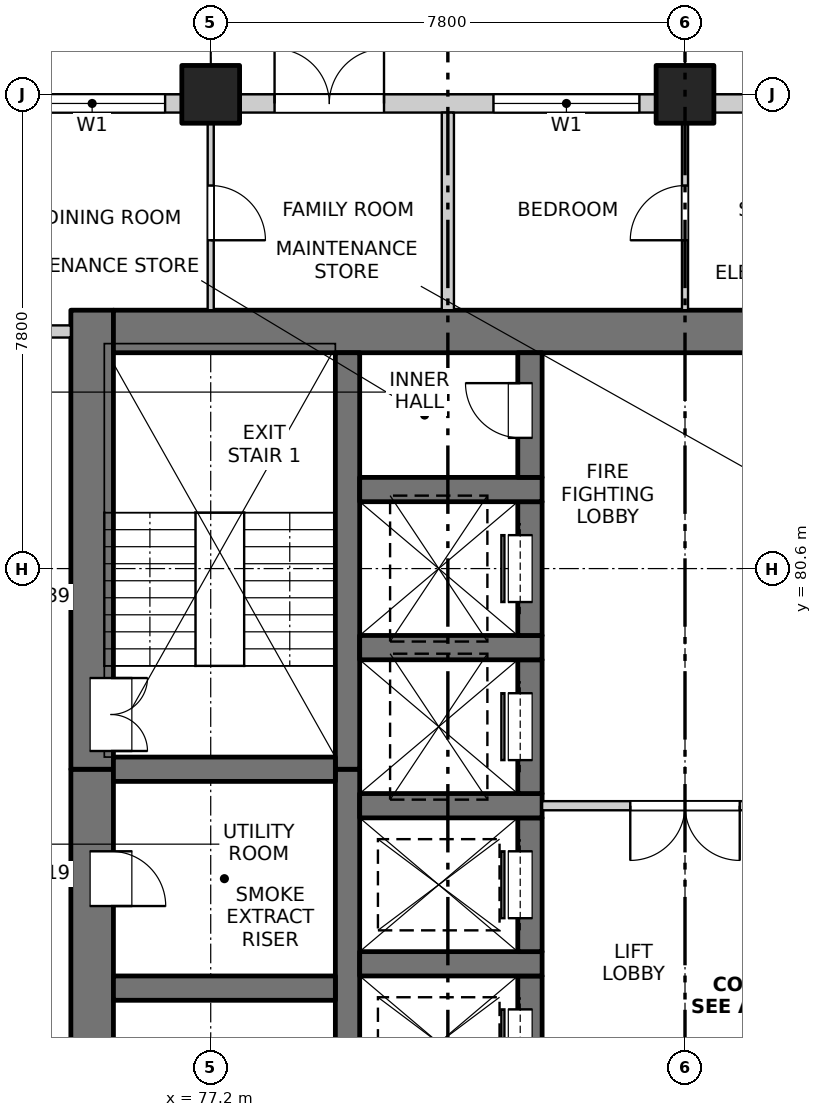
"""IFC4 building model, lengths in metres.
Left out: names, types, materials, properties, quantities, classifications, styles, units other than length and angle.
Written with IfcOpenShell. Run it as: python <this file> out.ifc"""

import sys

from ifc_helpers import new_model, si_unit, direction, frame, frame_2d, origin, origin_2d, place, context, subcontext, project, spatial, rectangle, extrude, element, fill, save


model = new_model("IFC4")
c1 = context("Model", 3, precision=1e-05, world=origin(), true_north=direction((0.0, 1.0)))
c2 = subcontext(c1, "Body", "Model", "MODEL_VIEW")
j1 = project(units=[si_unit("LENGTHUNIT", "METRE"), si_unit("PLANEANGLEUNIT", "RADIAN")], contexts=[c1])
p1 = place(None, origin())
s1 = spatial("IfcSite", under=j1, at=p1, CompositionType="ELEMENT")
p2 = place(p1, origin())
s2 = spatial("IfcBuilding", under=s1, at=p2, CompositionType="ELEMENT")
p3 = place(p2, frame((0.0, 0.0, 58.0)))
s3 = spatial("IfcBuildingStorey", under=s2, at=p3, CompositionType="ELEMENT", Elevation=58.0)
for number, where, z_axis, x_axis in (
    (1, (77.2, 88.4, -0.25), (0.0, 0.0, 1.0), (1.0, 0.0, 0.0)),
    (2, (85.0, 88.4, -0.25), (0.0, 0.0, 1.0), (1.0, 0.0, 0.0)),
):
    element("IfcColumn", number, at=place(p3, frame(where, z_axis=z_axis, x_axis=x_axis)), inside=s3, PredefinedType="COLUMN", context=c2, shape_type="SweptSolid", body=[
        extrude(rectangle(XDim=0.95, YDim=0.95, at=origin_2d()), origin(), (0.0, 0.0, 1.0), 3.4),
    ])
p4 = place(p3, frame((75.25, 54.9, -0.25), z_axis=(0.0, 0.0, 1.0), x_axis=(0.0, 1.0, 0.0)))
e3 = element("IfcWall", 3, at=p4, inside=s3, PredefinedType="SOLIDWALL", context=c2, shape_type="SweptSolid", body=[
    extrude(rectangle(XDim=22.4, YDim=0.7, at=frame_2d((11.2, 0.0))), origin(), (0.0, 0.0, 1.0), 3.4),
])
p5 = place(p4, frame((7.55, 0.0, 0.25)))
e4 = element("IfcOpeningElement", 4, at=p5, cuts=e3, PredefinedType="OPENING", context=c2, shape_type="SweptSolid", body=[
    extrude(rectangle(XDim=0.9, YDim=2.1, at=frame_2d((0.45, 1.05))), frame((0.0, 0.36, 0.0), z_axis=(0.0, -1.0, 0.0), x_axis=(1.0, 0.0, 0.0)), (0.0, 0.0, 1.0), 0.72),
])
p6 = place(p4, frame((12.2, 0.0, 0.25)))
e5 = element("IfcOpeningElement", 5, at=p6, cuts=e3, PredefinedType="OPENING", context=c2, shape_type="SweptSolid", body=[
    extrude(rectangle(XDim=0.9, YDim=2.1, at=frame_2d((0.45, 1.05))), frame((0.0, 0.36, 0.0), z_axis=(0.0, -1.0, 0.0), x_axis=(1.0, 0.0, 0.0)), (0.0, 0.0, 1.0), 0.72),
])
p7 = place(p4, frame((16.7, 0.0, 0.25)))
e6 = element("IfcOpeningElement", 6, at=p7, cuts=e3, PredefinedType="OPENING", context=c2, shape_type="SweptSolid", body=[
    extrude(rectangle(XDim=0.9, YDim=2.1, at=frame_2d((0.45, 1.05))), frame((0.0, 0.36, 0.0), z_axis=(0.0, -1.0, 0.0), x_axis=(1.0, 0.0, 0.0)), (0.0, 0.0, 1.0), 0.72),
])
p8 = place(p4, frame((20.15, 0.0, 0.25)))
e7 = element("IfcOpeningElement", 7, at=p8, cuts=e3, PredefinedType="OPENING", context=c2, shape_type="SweptSolid", body=[
    extrude(rectangle(XDim=0.9, YDim=2.1, at=frame_2d((0.45, 1.05))), frame((0.0, 0.36, 0.0), z_axis=(0.0, -1.0, 0.0), x_axis=(1.0, 0.0, 0.0)), (0.0, 0.0, 1.0), 0.72),
])
p9 = place(p3, frame((75.25, 77.3, -0.25), z_axis=(0.0, 0.0, 1.0), x_axis=(0.0, 1.0, 0.0)))
e8 = element("IfcWall", 8, at=p9, inside=s3, PredefinedType="SOLIDWALL", context=c2, shape_type="SweptSolid", body=[
    extrude(rectangle(XDim=7.55, YDim=0.7, at=frame_2d((3.775, 0.0))), origin(), (0.0, 0.0, 1.0), 3.4),
])
p10 = place(p9, frame((0.3, 0.0, 0.25)))
e9 = element("IfcOpeningElement", 9, at=p10, cuts=e8, PredefinedType="OPENING", context=c2, shape_type="SweptSolid", body=[
    extrude(rectangle(XDim=1.2, YDim=2.1, at=frame_2d((0.6, 1.05))), frame((0.0, 0.36, 0.0), z_axis=(0.0, -1.0, 0.0), x_axis=(1.0, 0.0, 0.0)), (0.0, 0.0, 1.0), 0.72),
])
p11 = place(p3, frame((75.6, 84.5, -0.25), z_axis=(0.0, 0.0, 1.0), x_axis=(1.0, 0.0, 0.0)))
e10 = element("IfcWall", 10, at=p11, inside=s3, PredefinedType="SOLIDWALL", context=c2, shape_type="SweptSolid", body=[
    extrude(rectangle(XDim=18.8, YDim=0.7, at=frame_2d((9.4, 0.0))), origin(), (0.0, 0.0, 1.0), 3.4),
])
p12 = place(p3, frame((79.45, 60.9, -0.25), z_axis=(0.0, 0.0, 1.0), x_axis=(0.0, 1.0, 0.0)))
e11 = element("IfcWall", 11, at=p12, inside=s3, PredefinedType="SOLIDWALL", context=c2, shape_type="SweptSolid", body=[
    extrude(rectangle(XDim=16.4, YDim=0.4, at=frame_2d((8.2, 0.0))), origin(), (0.0, 0.0, 1.0), 3.4),
])
p13 = place(p3, frame((79.45, 77.3, -0.25), z_axis=(0.0, 0.0, 1.0), x_axis=(0.0, 1.0, 0.0)))
e12 = element("IfcWall", 12, at=p13, inside=s3, PredefinedType="SOLIDWALL", context=c2, shape_type="SweptSolid", body=[
    extrude(rectangle(XDim=6.85, YDim=0.4, at=frame_2d((3.425, 0.0))), origin(), (0.0, 0.0, 1.0), 3.4),
])
p14 = place(p3, frame((82.45, 71.7, -0.25), z_axis=(0.0, 0.0, 1.0), x_axis=(0.0, 1.0, 0.0)))
e13 = element("IfcWall", 13, at=p14, inside=s3, PredefinedType="SOLIDWALL", context=c2, shape_type="SweptSolid", body=[
    extrude(rectangle(XDim=2.2, YDim=0.4, at=frame_2d((1.1, 0.0))), origin(), (0.0, 0.0, 1.0), 3.4),
])
p15 = place(p14, frame((0.55, 0.0, 0.25)))
e14 = element("IfcOpeningElement", 14, at=p15, cuts=e13, PredefinedType="OPENING", context=c2, shape_type="SweptSolid", body=[
    extrude(rectangle(XDim=1.1, YDim=2.1, at=frame_2d((0.55, 1.05))), frame((0.0, 0.21, 0.0), z_axis=(0.0, -1.0, 0.0), x_axis=(1.0, 0.0, 0.0)), (0.0, 0.0, 1.0), 0.42),
])
p16 = place(p3, frame((79.65, 74.1, -0.25), z_axis=(0.0, 0.0, 1.0), x_axis=(1.0, 0.0, 0.0)))
e15 = element("IfcWall", 15, at=p16, inside=s3, PredefinedType="SOLIDWALL", context=c2, shape_type="SweptSolid", body=[
    extrude(rectangle(XDim=3.0, YDim=0.4, at=frame_2d((1.5, 0.0))), origin(), (0.0, 0.0, 1.0), 3.4),
])
p17 = place(p3, frame((82.45, 74.3, -0.25), z_axis=(0.0, 0.0, 1.0), x_axis=(0.0, 1.0, 0.0)))
e16 = element("IfcWall", 16, at=p17, inside=s3, PredefinedType="SOLIDWALL", context=c2, shape_type="SweptSolid", body=[
    extrude(rectangle(XDim=2.2, YDim=0.4, at=frame_2d((1.1, 0.0))), origin(), (0.0, 0.0, 1.0), 3.4),
])
p18 = place(p17, frame((0.55, 0.0, 0.25)))
e17 = element("IfcOpeningElement", 17, at=p18, cuts=e16, PredefinedType="OPENING", context=c2, shape_type="SweptSolid", body=[
    extrude(rectangle(XDim=1.1, YDim=2.1, at=frame_2d((0.55, 1.05))), frame((0.0, 0.21, 0.0), z_axis=(0.0, -1.0, 0.0), x_axis=(1.0, 0.0, 0.0)), (0.0, 0.0, 1.0), 0.42),
])
p19 = place(p3, frame((79.65, 76.7, -0.25), z_axis=(0.0, 0.0, 1.0), x_axis=(1.0, 0.0, 0.0)))
e18 = element("IfcWall", 18, at=p19, inside=s3, PredefinedType="SOLIDWALL", context=c2, shape_type="SweptSolid", body=[
    extrude(rectangle(XDim=3.0, YDim=0.4, at=frame_2d((1.5, 0.0))), origin(), (0.0, 0.0, 1.0), 3.4),
])
p20 = place(p3, frame((82.45, 76.9, -0.25), z_axis=(0.0, 0.0, 1.0), x_axis=(0.0, 1.0, 0.0)))
e19 = element("IfcWall", 19, at=p20, inside=s3, PredefinedType="SOLIDWALL", context=c2, shape_type="SweptSolid", body=[
    extrude(rectangle(XDim=2.2, YDim=0.4, at=frame_2d((1.1, 0.0))), origin(), (0.0, 0.0, 1.0), 3.4),
])
p21 = place(p20, frame((0.55, 0.0, 0.25)))
e20 = element("IfcOpeningElement", 20, at=p21, cuts=e19, PredefinedType="OPENING", context=c2, shape_type="SweptSolid", body=[
    extrude(rectangle(XDim=1.1, YDim=2.1, at=frame_2d((0.55, 1.05))), frame((0.0, 0.21, 0.0), z_axis=(0.0, -1.0, 0.0), x_axis=(1.0, 0.0, 0.0)), (0.0, 0.0, 1.0), 0.42),
])
p22 = place(p3, frame((79.65, 79.3, -0.25), z_axis=(0.0, 0.0, 1.0), x_axis=(1.0, 0.0, 0.0)))
e21 = element("IfcWall", 21, at=p22, inside=s3, PredefinedType="SOLIDWALL", context=c2, shape_type="SweptSolid", body=[
    extrude(rectangle(XDim=3.0, YDim=0.4, at=frame_2d((1.5, 0.0))), origin(), (0.0, 0.0, 1.0), 3.4),
])
p23 = place(p3, frame((82.45, 79.5, -0.25), z_axis=(0.0, 0.0, 1.0), x_axis=(0.0, 1.0, 0.0)))
e22 = element("IfcWall", 22, at=p23, inside=s3, PredefinedType="SOLIDWALL", context=c2, shape_type="SweptSolid", body=[
    extrude(rectangle(XDim=2.2, YDim=0.4, at=frame_2d((1.1, 0.0))), origin(), (0.0, 0.0, 1.0), 3.4),
])
p24 = place(p23, frame((0.55, 0.0, 0.25)))
e23 = element("IfcOpeningElement", 23, at=p24, cuts=e22, PredefinedType="OPENING", context=c2, shape_type="SweptSolid", body=[
    extrude(rectangle(XDim=1.1, YDim=2.1, at=frame_2d((0.55, 1.05))), frame((0.0, 0.21, 0.0), z_axis=(0.0, -1.0, 0.0), x_axis=(1.0, 0.0, 0.0)), (0.0, 0.0, 1.0), 0.42),
])
p25 = place(p3, frame((79.65, 81.9, -0.25), z_axis=(0.0, 0.0, 1.0), x_axis=(1.0, 0.0, 0.0)))
e24 = element("IfcWall", 24, at=p25, inside=s3, PredefinedType="SOLIDWALL", context=c2, shape_type="SweptSolid", body=[
    extrude(rectangle(XDim=3.0, YDim=0.4, at=frame_2d((1.5, 0.0))), origin(), (0.0, 0.0, 1.0), 3.4),
])
p26 = place(p3, frame((82.45, 82.1, -0.25), z_axis=(0.0, 0.0, 1.0), x_axis=(0.0, 1.0, 0.0)))
e25 = element("IfcWall", 25, at=p26, inside=s3, PredefinedType="SOLIDWALL", context=c2, shape_type="SweptSolid", body=[
    extrude(rectangle(XDim=2.05, YDim=0.4, at=frame_2d((1.025, 0.0))), origin(), (0.0, 0.0, 1.0), 3.4),
])
p27 = place(p26, frame((0.65, 0.0, 0.25)))
e26 = element("IfcOpeningElement", 26, at=p27, cuts=e25, PredefinedType="OPENING", context=c2, shape_type="SweptSolid", body=[
    extrude(rectangle(XDim=0.9, YDim=2.1, at=frame_2d((0.45, 1.05))), frame((0.0, 0.21, 0.0), z_axis=(0.0, -1.0, 0.0), x_axis=(1.0, 0.0, 0.0)), (0.0, 0.0, 1.0), 0.42),
])
for number, where, z_axis, x_axis in (
    (27, (75.6, 73.7, -0.25), (0.0, 0.0, 1.0), (1.0, 0.0, 0.0)),
    (28, (75.6, 77.3, -0.25), (0.0, 0.0, 1.0), (1.0, 0.0, 0.0)),
):
    element("IfcWall", number, at=place(p3, frame(where, z_axis=z_axis, x_axis=x_axis)), inside=s3, PredefinedType="SOLIDWALL", context=c2, shape_type="SweptSolid", body=[
        extrude(rectangle(XDim=3.65, YDim=0.4, at=frame_2d((1.825, 0.0))), origin(), (0.0, 0.0, 1.0), 3.4),
    ])
p28 = place(p3, frame((69.875, 88.25, 0.0), z_axis=(0.0, 0.0, 1.0), x_axis=(1.0, 0.0, 0.0)))
e29 = element("IfcWall", 29, at=p28, inside=s3, PredefinedType="SOLIDWALL", context=c2, shape_type="SweptSolid", body=[
    extrude(rectangle(XDim=6.85, YDim=0.3, at=frame_2d((3.425, 0.0))), origin(), (0.0, 0.0, 1.0), 2.7),
])
p29 = place(p28, frame((0.575, 0.0, 0.0)))
e30 = element("IfcOpeningElement", 30, at=p29, cuts=e29, PredefinedType="OPENING", context=c2, shape_type="SweptSolid", body=[
    extrude(rectangle(XDim=1.8, YDim=2.4, at=frame_2d((0.9, 1.2))), frame((0.0, 0.16, 0.0), z_axis=(0.0, -1.0, 0.0), x_axis=(1.0, 0.0, 0.0)), (0.0, 0.0, 1.0), 0.32),
])
p30 = place(p28, frame((4.175, 0.0, 0.9)))
e31 = element("IfcOpeningElement", 31, at=p30, cuts=e29, PredefinedType="OPENING", context=c2, shape_type="SweptSolid", body=[
    extrude(rectangle(XDim=2.4, YDim=1.8, at=frame_2d((1.2, 0.9))), frame((0.0, 0.16, 0.0), z_axis=(0.0, -1.0, 0.0), x_axis=(1.0, 0.0, 0.0)), (0.0, 0.0, 1.0), 0.32),
])
p31 = place(p3, frame((77.675, 88.25, 0.0), z_axis=(0.0, 0.0, 1.0), x_axis=(1.0, 0.0, 0.0)))
e32 = element("IfcWall", 32, at=p31, inside=s3, PredefinedType="SOLIDWALL", context=c2, shape_type="SweptSolid", body=[
    extrude(rectangle(XDim=6.85, YDim=0.3, at=frame_2d((3.425, 0.0))), origin(), (0.0, 0.0, 1.0), 2.7),
])
p32 = place(p31, frame((0.575, 0.0, 0.0)))
e33 = element("IfcOpeningElement", 33, at=p32, cuts=e32, PredefinedType="OPENING", context=c2, shape_type="SweptSolid", body=[
    extrude(rectangle(XDim=1.8, YDim=2.4, at=frame_2d((0.9, 1.2))), frame((0.0, 0.16, 0.0), z_axis=(0.0, -1.0, 0.0), x_axis=(1.0, 0.0, 0.0)), (0.0, 0.0, 1.0), 0.32),
])
p33 = place(p31, frame((4.175, 0.0, 0.9)))
e34 = element("IfcOpeningElement", 34, at=p33, cuts=e32, PredefinedType="OPENING", context=c2, shape_type="SweptSolid", body=[
    extrude(rectangle(XDim=2.4, YDim=1.8, at=frame_2d((1.2, 0.9))), frame((0.0, 0.16, 0.0), z_axis=(0.0, -1.0, 0.0), x_axis=(1.0, 0.0, 0.0)), (0.0, 0.0, 1.0), 0.32),
])
p34 = place(p3, frame((85.475, 88.25, 0.0), z_axis=(0.0, 0.0, 1.0), x_axis=(1.0, 0.0, 0.0)))
e35 = element("IfcWall", 35, at=p34, inside=s3, PredefinedType="SOLIDWALL", context=c2, shape_type="SweptSolid", body=[
    extrude(rectangle(XDim=6.85, YDim=0.3, at=frame_2d((3.425, 0.0))), origin(), (0.0, 0.0, 1.0), 2.7),
])
p35 = place(p34, frame((0.575, 0.0, 0.0)))
e36 = element("IfcOpeningElement", 36, at=p35, cuts=e35, PredefinedType="OPENING", context=c2, shape_type="SweptSolid", body=[
    extrude(rectangle(XDim=1.8, YDim=2.4, at=frame_2d((0.9, 1.2))), frame((0.0, 0.16, 0.0), z_axis=(0.0, -1.0, 0.0), x_axis=(1.0, 0.0, 0.0)), (0.0, 0.0, 1.0), 0.32),
])
p36 = place(p34, frame((4.175, 0.0, 0.9)))
e37 = element("IfcOpeningElement", 37, at=p36, cuts=e35, PredefinedType="OPENING", context=c2, shape_type="SweptSolid", body=[
    extrude(rectangle(XDim=2.4, YDim=1.8, at=frame_2d((1.2, 0.9))), frame((0.0, 0.16, 0.0), z_axis=(0.0, -1.0, 0.0), x_axis=(1.0, 0.0, 0.0)), (0.0, 0.0, 1.0), 0.32),
])
p37 = place(p3, frame((82.65, 76.7, 0.0), z_axis=(0.0, 0.0, 1.0), x_axis=(1.0, 0.0, 0.0)))
e38 = element("IfcWall", 38, at=p37, inside=s3, PredefinedType="PARTITIONING", context=c2, shape_type="SweptSolid", body=[
    extrude(rectangle(XDim=4.7, YDim=0.15, at=frame_2d((2.35, 0.0))), origin(), (0.0, 0.0, 1.0), 3.15),
])
p38 = place(p37, frame((1.45, 0.0, 0.0)))
e39 = element("IfcOpeningElement", 39, at=p38, cuts=e38, PredefinedType="OPENING", context=c2, shape_type="SweptSolid", body=[
    extrude(rectangle(XDim=1.8, YDim=2.1, at=frame_2d((0.9, 1.05))), frame((0.0, 0.085, 0.0), z_axis=(0.0, -1.0, 0.0), x_axis=(1.0, 0.0, 0.0)), (0.0, 0.0, 1.0), 0.17),
])
p39 = place(p3, frame((73.2, 84.5, 0.0), z_axis=(0.0, 0.0, 1.0), x_axis=(1.0, 0.0, 0.0)))
e40 = element("IfcWall", 40, at=p39, inside=s3, PredefinedType="PARTITIONING", context=c2, shape_type="SweptSolid", body=[
    extrude(rectangle(XDim=1.7, YDim=0.2, at=frame_2d((0.85, 0.0))), origin(), (0.0, 0.0, 1.0), 3.15),
])
p40 = place(p3, frame((77.2, 84.85, 0.0), z_axis=(0.0, 0.0, 1.0), x_axis=(0.0, 1.0, 0.0)))
e41 = element("IfcWall", 41, at=p40, inside=s3, PredefinedType="PARTITIONING", context=c2, shape_type="SweptSolid", body=[
    extrude(rectangle(XDim=3.25, YDim=0.1, at=frame_2d((1.625, 0.0))), origin(), (0.0, 0.0, 1.0), 3.15),
])
p41 = place(p40, frame((1.15, 0.0, 0.0)))
e42 = element("IfcOpeningElement", 42, at=p41, cuts=e41, PredefinedType="OPENING", context=c2, shape_type="SweptSolid", body=[
    extrude(rectangle(XDim=0.9, YDim=2.1, at=frame_2d((0.45, 1.05))), frame((0.0, 0.06, 0.0), z_axis=(0.0, -1.0, 0.0), x_axis=(1.0, 0.0, 0.0)), (0.0, 0.0, 1.0), 0.12),
])
p42 = place(p3, frame((81.1, 84.85, 0.0), z_axis=(0.0, 0.0, 1.0), x_axis=(0.0, 1.0, 0.0)))
e43 = element("IfcWall", 43, at=p42, inside=s3, PredefinedType="PARTITIONING", context=c2, shape_type="SweptSolid", body=[
    extrude(rectangle(XDim=3.25, YDim=0.2, at=frame_2d((1.625, 0.0))), origin(), (0.0, 0.0, 1.0), 3.15),
])
p43 = place(p3, frame((85.0, 84.85, 0.0), z_axis=(0.0, 0.0, 1.0), x_axis=(0.0, 1.0, 0.0)))
e44 = element("IfcWall", 44, at=p43, inside=s3, PredefinedType="PARTITIONING", context=c2, shape_type="SweptSolid", body=[
    extrude(rectangle(XDim=3.25, YDim=0.1, at=frame_2d((1.625, 0.0))), origin(), (0.0, 0.0, 1.0), 3.15),
])
p44 = place(p43, frame((1.15, 0.0, 0.0)))
e45 = element("IfcOpeningElement", 45, at=p44, cuts=e44, PredefinedType="OPENING", context=c2, shape_type="SweptSolid", body=[
    extrude(rectangle(XDim=0.9, YDim=2.1, at=frame_2d((0.45, 1.05))), frame((0.0, 0.06, 0.0), z_axis=(0.0, -1.0, 0.0), x_axis=(1.0, 0.0, 0.0)), (0.0, 0.0, 1.0), 0.12),
])
p45 = place(p30, origin())
e46 = element("IfcWindow", 46, at=p45, inside=s3, PartitioningType="DOUBLE_PANEL_VERTICAL", PredefinedType="WINDOW", context=c2, shape_type="SweptSolid", body=[
    extrude(rectangle(XDim=2.4, YDim=1.8, at=frame_2d((1.2, 0.9))), frame((0.0, 0.03, 0.0), z_axis=(0.0, -1.0, 0.0), x_axis=(1.0, 0.0, 0.0)), (0.0, 0.0, 1.0), 0.06),
])
fill(e31, e46)
p46 = place(p32, origin())
e47 = element("IfcDoor", 47, at=p46, inside=s3, OperationType="DOUBLE_DOOR_SINGLE_SWING", PredefinedType="DOOR", context=c2, shape_type="SweptSolid", body=[
    extrude(rectangle(XDim=1.8, YDim=2.4, at=frame_2d((0.9, 1.2))), frame((0.0, 0.025, 0.0), z_axis=(0.0, -1.0, 0.0), x_axis=(1.0, 0.0, 0.0)), (0.0, 0.0, 1.0), 0.05),
])
fill(e33, e47)
p47 = place(p33, origin())
e48 = element("IfcWindow", 48, at=p47, inside=s3, PartitioningType="DOUBLE_PANEL_VERTICAL", PredefinedType="WINDOW", context=c2, shape_type="SweptSolid", body=[
    extrude(rectangle(XDim=2.4, YDim=1.8, at=frame_2d((1.2, 0.9))), frame((0.0, 0.03, 0.0), z_axis=(0.0, -1.0, 0.0), x_axis=(1.0, 0.0, 0.0)), (0.0, 0.0, 1.0), 0.06),
])
fill(e34, e48)
p48 = place(p15, origin())
e49 = element("IfcDoor", 49, at=p48, inside=s3, OperationType="SLIDING_TO_LEFT", PredefinedType="DOOR", context=c2, shape_type="SweptSolid", body=[
    extrude(rectangle(XDim=1.1, YDim=2.1, at=frame_2d((0.55, 1.05))), frame((0.0, 0.185, 0.0), z_axis=(0.0, -1.0, 0.0), x_axis=(1.0, 0.0, 0.0)), (0.0, 0.0, 1.0), 0.05),
])
fill(e14, e49)
p49 = place(p18, origin())
e50 = element("IfcDoor", 50, at=p49, inside=s3, OperationType="SLIDING_TO_LEFT", PredefinedType="DOOR", context=c2, shape_type="SweptSolid", body=[
    extrude(rectangle(XDim=1.1, YDim=2.1, at=frame_2d((0.55, 1.05))), frame((0.0, 0.185, 0.0), z_axis=(0.0, -1.0, 0.0), x_axis=(1.0, 0.0, 0.0)), (0.0, 0.0, 1.0), 0.05),
])
fill(e17, e50)
p50 = place(p8, origin())
e51 = element("IfcDoor", 51, at=p50, inside=s3, OperationType="SINGLE_SWING_RIGHT", PredefinedType="DOOR", context=c2, shape_type="SweptSolid", body=[
    extrude(rectangle(XDim=0.9, YDim=2.1, at=frame_2d((0.45, 1.05))), frame((0.0, -0.285, 0.0), z_axis=(0.0, -1.0, 0.0), x_axis=(1.0, 0.0, 0.0)), (0.0, 0.0, 1.0), 0.05),
])
fill(e7, e51)
p51 = place(p38, origin())
e52 = element("IfcDoor", 52, at=p51, inside=s3, OperationType="DOUBLE_DOOR_SINGLE_SWING", PredefinedType="DOOR", context=c2, shape_type="SweptSolid", body=[
    extrude(rectangle(XDim=1.8, YDim=2.1, at=frame_2d((0.9, 1.05))), frame((0.0, 0.025, 0.0), z_axis=(0.0, -1.0, 0.0), x_axis=(1.0, 0.0, 0.0)), (0.0, 0.0, 1.0), 0.05),
])
fill(e39, e52)
p52 = place(p21, origin())
e53 = element("IfcDoor", 53, at=p52, inside=s3, OperationType="SLIDING_TO_LEFT", PredefinedType="DOOR", context=c2, shape_type="SweptSolid", body=[
    extrude(rectangle(XDim=1.1, YDim=2.1, at=frame_2d((0.55, 1.05))), frame((0.0, 0.185, 0.0), z_axis=(0.0, -1.0, 0.0), x_axis=(1.0, 0.0, 0.0)), (0.0, 0.0, 1.0), 0.05),
])
fill(e20, e53)
p53 = place(p10, origin())
e54 = element("IfcDoor", 54, at=p53, inside=s3, OperationType="DOUBLE_DOOR_SINGLE_SWING", PredefinedType="DOOR", context=c2, shape_type="SweptSolid", body=[
    extrude(rectangle(XDim=1.2, YDim=2.1, at=frame_2d((0.6, 1.05))), frame((0.0, -0.285, 0.0), z_axis=(0.0, -1.0, 0.0), x_axis=(1.0, 0.0, 0.0)), (0.0, 0.0, 1.0), 0.05),
])
fill(e9, e54)
p54 = place(p24, origin())
e55 = element("IfcDoor", 55, at=p54, inside=s3, OperationType="SLIDING_TO_LEFT", PredefinedType="DOOR", context=c2, shape_type="SweptSolid", body=[
    extrude(rectangle(XDim=1.1, YDim=2.1, at=frame_2d((0.55, 1.05))), frame((0.0, 0.185, 0.0), z_axis=(0.0, -1.0, 0.0), x_axis=(1.0, 0.0, 0.0)), (0.0, 0.0, 1.0), 0.05),
])
fill(e23, e55)
p55 = place(p27, origin())
e56 = element("IfcDoor", 56, at=p55, inside=s3, OperationType="SINGLE_SWING_RIGHT", PredefinedType="DOOR", context=c2, shape_type="SweptSolid", body=[
    extrude(rectangle(XDim=0.9, YDim=2.1, at=frame_2d((0.45, 1.05))), frame((0.0, 0.185, 0.0), z_axis=(0.0, -1.0, 0.0), x_axis=(1.0, 0.0, 0.0)), (0.0, 0.0, 1.0), 0.05),
])
fill(e26, e56)
p56 = place(p41, origin())
e57 = element("IfcDoor", 57, at=p56, inside=s3, OperationType="SINGLE_SWING_RIGHT", PredefinedType="DOOR", context=c2, shape_type="SweptSolid", body=[
    extrude(rectangle(XDim=0.9, YDim=2.1, at=frame_2d((0.45, 1.05))), frame((0.0, 0.025, 0.0), z_axis=(0.0, -1.0, 0.0), x_axis=(1.0, 0.0, 0.0)), (0.0, 0.0, 1.0), 0.05),
])
fill(e42, e57)
p57 = place(p44, origin())
e58 = element("IfcDoor", 58, at=p57, inside=s3, OperationType="SINGLE_SWING_LEFT", PredefinedType="DOOR", context=c2, shape_type="SweptSolid", body=[
    extrude(rectangle(XDim=0.9, YDim=2.1, at=frame_2d((0.45, 1.05))), frame((0.0, 0.025, 0.0), z_axis=(0.0, -1.0, 0.0), x_axis=(1.0, 0.0, 0.0)), (0.0, 0.0, 1.0), 0.05),
])
fill(e45, e58)
save(model, sys.argv[1])
